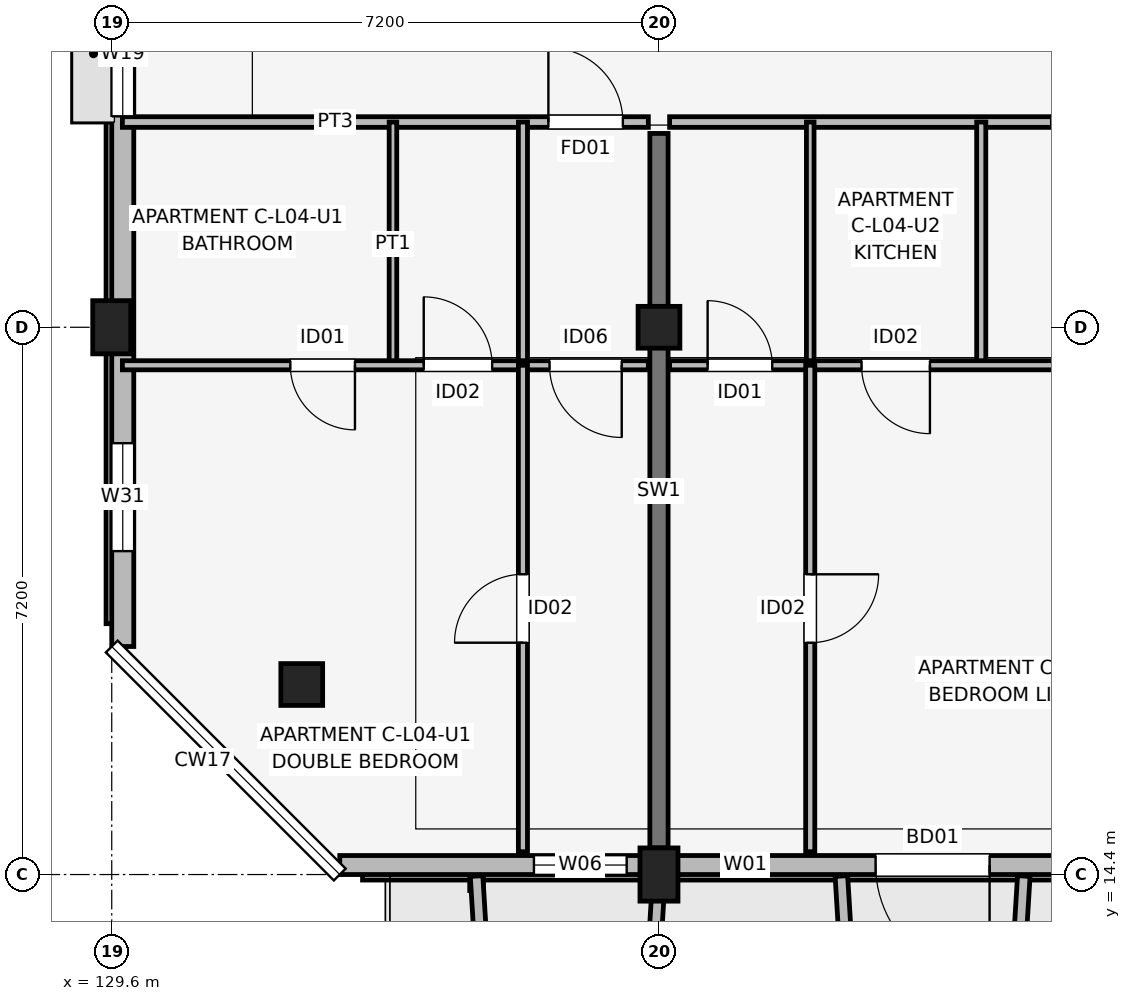
"""IFC4 building model, lengths in metres.
Left out: names, types, materials, properties, quantities, classifications, styles, units other than length and angle.
Written with IfcOpenShell. Run it as: python <this file> out.ifc"""

import sys

from ifc_helpers import new_model, si_unit, direction, frame, frame_2d, origin, origin_2d, place, context, subcontext, project, spatial, rectangle, extrude, element, fill, save


model = new_model("IFC4")
c1 = context("Model", 3, precision=1e-05, world=origin(), true_north=direction((0.0, 1.0)))
c2 = subcontext(c1, "Body", "Model", "MODEL_VIEW")
j1 = project(units=[si_unit("LENGTHUNIT", "METRE"), si_unit("PLANEANGLEUNIT", "RADIAN")], contexts=[c1])
p1 = place(None, origin())
s1 = spatial("IfcSite", under=j1, at=p1, CompositionType="ELEMENT")
p2 = place(p1, origin())
s2 = spatial("IfcBuilding", under=s1, at=p2, CompositionType="ELEMENT")
p3 = place(p2, frame((0.0, 0.0, 15.0)))
s3 = spatial("IfcBuildingStorey", under=s2, at=p3, CompositionType="ELEMENT", Elevation=15.0)
p4 = place(p3, frame((132.1, 16.9, 0.0), z_axis=(0.0, 0.0, 1.0), x_axis=(1.0, 0.0, 0.0)))
e1 = element("IfcColumn", 1, at=p4, inside=s3, PredefinedType="COLUMN", context=c2, shape_type="SweptSolid", body=[
    extrude(rectangle(XDim=0.55, YDim=0.55, at=origin_2d()), origin(), (0.0, 0.0, 1.0), 3.15),
])
for number, where, z_axis, x_axis in (
    (2, (129.6, 21.6, 0.0), (0.0, 0.0, 1.0), (1.0, 0.0, 0.0)),
    (3, (136.8, 14.4, 0.0), (0.0, 0.0, 1.0), (1.0, 0.0, 0.0)),
):
    element("IfcColumn", number, at=place(p3, frame(where, z_axis=z_axis, x_axis=x_axis)), inside=s3, PredefinedType="COLUMN", context=c2, shape_type="SweptSolid", body=[
        extrude(rectangle(XDim=0.5, YDim=0.7, at=origin_2d()), origin(), (0.0, 0.0, 1.0), 3.15),
    ])
p5 = place(p3, frame((136.8, 21.6, 0.0), z_axis=(0.0, 0.0, 1.0), x_axis=(1.0, 0.0, 0.0)))
e4 = element("IfcColumn", 4, at=p5, inside=s3, PredefinedType="COLUMN", context=c2, shape_type="SweptSolid", body=[
    extrude(rectangle(XDim=0.55, YDim=0.55, at=origin_2d()), origin(), (0.0, 0.0, 1.0), 3.15),
])
p6 = place(p3, frame((136.8, 14.75, 0.0), z_axis=(0.0, 0.0, 1.0), x_axis=(0.0, 1.0, 0.0)))
e5 = element("IfcWall", 5, at=p6, inside=s3, PredefinedType="SHEAR", context=c2, shape_type="SweptSolid", body=[
    extrude(rectangle(XDim=9.4, YDim=0.24, at=frame_2d((4.7, 0.0))), origin(), (0.0, 0.0, 1.0), 3.15),
])
p7 = place(p3, frame((132.6, 14.525, 0.0), z_axis=(0.0, 0.0, 1.0), x_axis=(1.0, 0.0, 0.0)))
e6 = element("IfcWall", 6, at=p7, inside=s3, PredefinedType="SOLIDWALL", context=c2, shape_type="SweptSolid", body=[
    extrude(rectangle(XDim=30.0, YDim=0.25, at=frame_2d((15.0, 0.0))), origin(), (0.0, 0.0, 1.0), 2.43),
])
p8 = place(p7, frame((8.55, 0.0, 0.0), z_axis=(0.0, 0.0, 1.0), x_axis=(-1.0, 0.0, 0.0)))
e7 = element("IfcOpeningElement", 7, at=p8, cuts=e6, PredefinedType="OPENING", context=c2, shape_type="SweptSolid", body=[
    extrude(rectangle(XDim=1.5, YDim=2.15, at=frame_2d((0.75, 1.075))), frame((0.0, 0.135, 0.0), z_axis=(0.0, -1.0, 0.0), x_axis=(1.0, 0.0, 0.0)), (0.0, 0.0, 1.0), 0.27),
])
p9 = place(p7, frame((23.1, 0.0, 0.0), z_axis=(0.0, 0.0, 1.0), x_axis=(-1.0, 0.0, 0.0)))
e8 = element("IfcOpeningElement", 8, at=p9, cuts=e6, PredefinedType="OPENING", context=c2, shape_type="SweptSolid", body=[
    extrude(rectangle(XDim=1.8, YDim=2.15, at=frame_2d((0.9, 1.075))), frame((0.0, 0.135, 0.0), z_axis=(0.0, -1.0, 0.0), x_axis=(1.0, 0.0, 0.0)), (0.0, 0.0, 1.0), 0.27),
])
p10 = place(p7, frame((2.555, 0.0, 0.75)))
e9 = element("IfcOpeningElement", 9, at=p10, cuts=e6, PredefinedType="OPENING", context=c2, shape_type="SweptSolid", body=[
    extrude(rectangle(XDim=1.22, YDim=1.5, at=frame_2d((0.61, 0.75))), frame((0.0, 0.135, 0.0), z_axis=(0.0, -1.0, 0.0), x_axis=(1.0, 0.0, 0.0)), (0.0, 0.0, 1.0), 0.27),
])
p11 = place(p7, frame((5.035, 0.0, 0.75)))
e10 = element("IfcOpeningElement", 10, at=p11, cuts=e6, PredefinedType="OPENING", context=c2, shape_type="SweptSolid", body=[
    extrude(rectangle(XDim=0.6, YDim=1.25, at=frame_2d((0.3, 0.625))), frame((0.0, 0.135, 0.0), z_axis=(0.0, -1.0, 0.0), x_axis=(1.0, 0.0, 0.0)), (0.0, 0.0, 1.0), 0.27),
])
p12 = place(p7, frame((12.3, 0.0, 0.75)))
e11 = element("IfcOpeningElement", 11, at=p12, cuts=e6, PredefinedType="OPENING", context=c2, shape_type="SweptSolid", body=[
    extrude(rectangle(XDim=0.72, YDim=1.35, at=frame_2d((0.36, 0.675))), frame((0.0, 0.135, 0.0), z_axis=(0.0, -1.0, 0.0), x_axis=(1.0, 0.0, 0.0)), (0.0, 0.0, 1.0), 0.27),
])
p13 = place(p7, frame((14.0, 0.0, 0.67)))
e12 = element("IfcOpeningElement", 12, at=p13, cuts=e6, PredefinedType="OPENING", context=c2, shape_type="SweptSolid", body=[
    extrude(rectangle(XDim=2.0, YDim=1.65, at=frame_2d((1.0, 0.825))), frame((0.0, 0.135, 0.0), z_axis=(0.0, -1.0, 0.0), x_axis=(1.0, 0.0, 0.0)), (0.0, 0.0, 1.0), 0.27),
])
p14 = place(p7, frame((19.37, 0.0, 0.75)))
e13 = element("IfcOpeningElement", 13, at=p14, cuts=e6, PredefinedType="OPENING", context=c2, shape_type="SweptSolid", body=[
    extrude(rectangle(XDim=0.98, YDim=1.45, at=frame_2d((0.49, 0.725))), frame((0.0, 0.135, 0.0), z_axis=(0.0, -1.0, 0.0), x_axis=(1.0, 0.0, 0.0)), (0.0, 0.0, 1.0), 0.27),
])
p15 = place(p7, frame((26.215, 0.0, 0.7)))
e14 = element("IfcOpeningElement", 14, at=p15, cuts=e6, PredefinedType="OPENING", context=c2, shape_type="SweptSolid", body=[
    extrude(rectangle(XDim=1.86, YDim=1.6, at=frame_2d((0.93, 0.8))), frame((0.0, 0.135, 0.0), z_axis=(0.0, -1.0, 0.0), x_axis=(1.0, 0.0, 0.0)), (0.0, 0.0, 1.0), 0.27),
])
p16 = place(p3, frame((129.745, 33.0, 0.0), z_axis=(0.0, 0.0, 1.0), x_axis=(0.0, -1.0, 0.0)))
e15 = element("IfcWall", 15, at=p16, inside=s3, PredefinedType="SOLIDWALL", context=c2, shape_type="SweptSolid", body=[
    extrude(rectangle(XDim=15.6, YDim=0.29, at=frame_2d((7.8, 0.0))), origin(), (0.0, 0.0, 1.0), 2.38),
])
p17 = place(p16, frame((6.975, 0.0, 1.05)))
e16 = element("IfcOpeningElement", 16, at=p17, cuts=e15, PredefinedType="OPENING", context=c2, shape_type="SweptSolid", body=[
    extrude(rectangle(XDim=1.65, YDim=1.15, at=frame_2d((0.825, 0.575))), frame((0.0, 0.155, 0.0), z_axis=(0.0, -1.0, 0.0), x_axis=(1.0, 0.0, 0.0)), (0.0, 0.0, 1.0), 0.31),
])
p18 = place(p16, frame((12.925, 0.0, 0.67)))
e17 = element("IfcOpeningElement", 17, at=p18, cuts=e15, PredefinedType="OPENING", context=c2, shape_type="SweptSolid", body=[
    extrude(rectangle(XDim=1.42, YDim=1.6, at=frame_2d((0.71, 0.8))), frame((0.0, 0.155, 0.0), z_axis=(0.0, -1.0, 0.0), x_axis=(1.0, 0.0, 0.0)), (0.0, 0.0, 1.0), 0.31),
])
for number, where, z_axis, x_axis in (
    (18, (134.4, 14.38, 0.0), (0.0, 0.0, 1.0), (0.061, -0.998, 0.0)),
    (19, (136.8, 14.38, 0.0), (0.0, 0.0, 1.0), (-0.061, -0.998, 0.0)),
):
    element("IfcWall", number, at=place(p3, frame(where, z_axis=z_axis, x_axis=x_axis)), inside=s3, PredefinedType="ELEMENTEDWALL", context=c2, shape_type="SweptSolid", body=[
        extrude(rectangle(XDim=1.964, YDim=0.165, at=frame_2d((0.982, 0.0))), origin(), (0.0, 0.0, 1.0), 2.95),
    ])
for number, where, z_axis, x_axis in (
    (20, (139.2, 14.38, 0.0), (0.0, 0.0, 1.0), (0.061, -0.998, 0.0)),
    (21, (141.6, 14.38, 0.0), (0.0, 0.0, 1.0), (-0.061, -0.998, 0.0)),
):
    element("IfcWall", number, at=place(p3, frame(where, z_axis=z_axis, x_axis=x_axis)), inside=s3, PredefinedType="ELEMENTEDWALL", context=c2, shape_type="SweptSolid", body=[
        extrude(rectangle(XDim=1.964, YDim=0.165, at=frame_2d((0.982, 0.0))), origin(), (0.0, 0.0, 1.0), 2.53),
    ])
p19 = place(p3, frame((129.74, 24.3, 0.0), z_axis=(0.0, 0.0, 1.0), x_axis=(1.0, 0.0, 0.0)))
e22 = element("IfcWall", 22, at=p19, inside=s3, PredefinedType="PARTITIONING", context=c2, shape_type="SweptSolid", body=[
    extrude(rectangle(XDim=6.92, YDim=0.14, at=frame_2d((3.46, 0.0))), origin(), (0.0, 0.0, 1.0), 2.38),
])
p20 = place(p19, frame((5.605, 0.0, 0.0)))
e23 = element("IfcOpeningElement", 23, at=p20, cuts=e22, PredefinedType="OPENING", context=c2, shape_type="SweptSolid", body=[
    extrude(rectangle(XDim=0.98, YDim=2.1, at=frame_2d((0.49, 1.05))), frame((0.0, 0.08, 0.0), z_axis=(0.0, -1.0, 0.0), x_axis=(1.0, 0.0, 0.0)), (0.0, 0.0, 1.0), 0.16),
])
p21 = place(p3, frame((133.3, 21.1, 0.0), z_axis=(0.0, 0.0, 1.0), x_axis=(0.0, 1.0, 0.0)))
e24 = element("IfcWall", 24, at=p21, inside=s3, PredefinedType="PARTITIONING", context=c2, shape_type="SweptSolid", body=[
    extrude(rectangle(XDim=3.2, YDim=0.1, at=frame_2d((1.6, 0.0))), origin(), (0.0, 0.0, 1.0), 2.375),
])
p22 = place(p3, frame((135.01, 21.1, 0.0), z_axis=(0.0, 0.0, 1.0), x_axis=(0.0, 1.0, 0.0)))
e25 = element("IfcWall", 25, at=p22, inside=s3, PredefinedType="PARTITIONING", context=c2, shape_type="SweptSolid", body=[
    extrude(rectangle(XDim=3.2, YDim=0.12, at=frame_2d((1.6, 0.0))), origin(), (0.0, 0.0, 1.0), 2.375),
])
p23 = place(p3, frame((129.74, 21.1, 0.0), z_axis=(0.0, 0.0, 1.0), x_axis=(1.0, 0.0, 0.0)))
e26 = element("IfcWall", 26, at=p23, inside=s3, PredefinedType="PARTITIONING", context=c2, shape_type="SweptSolid", body=[
    extrude(rectangle(XDim=6.92, YDim=0.12, at=frame_2d((3.46, 0.0))), origin(), (0.0, 0.0, 1.0), 2.38),
])
p24 = place(p23, frame((3.06, 0.0, 0.0), z_axis=(0.0, 0.0, 1.0), x_axis=(-1.0, 0.0, 0.0)))
e27 = element("IfcOpeningElement", 27, at=p24, cuts=e26, PredefinedType="OPENING", context=c2, shape_type="SweptSolid", body=[
    extrude(rectangle(XDim=0.85, YDim=2.08, at=frame_2d((0.425, 1.04))), frame((0.0, 0.07, 0.0), z_axis=(0.0, -1.0, 0.0), x_axis=(1.0, 0.0, 0.0)), (0.0, 0.0, 1.0), 0.14),
])
p25 = place(p23, frame((3.965, 0.0, 0.0)))
e28 = element("IfcOpeningElement", 28, at=p25, cuts=e26, PredefinedType="OPENING", context=c2, shape_type="SweptSolid", body=[
    extrude(rectangle(XDim=0.9, YDim=2.08, at=frame_2d((0.45, 1.04))), frame((0.0, 0.07, 0.0), z_axis=(0.0, -1.0, 0.0), x_axis=(1.0, 0.0, 0.0)), (0.0, 0.0, 1.0), 0.14),
])
p26 = place(p23, frame((6.57, 0.0, 0.0), z_axis=(0.0, 0.0, 1.0), x_axis=(-1.0, 0.0, 0.0)))
e29 = element("IfcOpeningElement", 29, at=p26, cuts=e26, PredefinedType="OPENING", context=c2, shape_type="SweptSolid", body=[
    extrude(rectangle(XDim=0.95, YDim=2.08, at=frame_2d((0.475, 1.04))), frame((0.0, 0.07, 0.0), z_axis=(0.0, -1.0, 0.0), x_axis=(1.0, 0.0, 0.0)), (0.0, 0.0, 1.0), 0.14),
])
p27 = place(p3, frame((135.01, 14.7, 0.0), z_axis=(0.0, 0.0, 1.0), x_axis=(0.0, 1.0, 0.0)))
e30 = element("IfcWall", 30, at=p27, inside=s3, PredefinedType="PARTITIONING", context=c2, shape_type="SweptSolid", body=[
    extrude(rectangle(XDim=6.4, YDim=0.12, at=frame_2d((3.2, 0.0))), origin(), (0.0, 0.0, 1.0), 2.38),
])
p28 = place(p27, frame((2.75, 0.0, 0.0)))
e31 = element("IfcOpeningElement", 31, at=p28, cuts=e30, PredefinedType="OPENING", context=c2, shape_type="SweptSolid", body=[
    extrude(rectangle(XDim=0.9, YDim=2.08, at=frame_2d((0.45, 1.04))), frame((0.0, 0.07, 0.0), z_axis=(0.0, -1.0, 0.0), x_axis=(1.0, 0.0, 0.0)), (0.0, 0.0, 1.0), 0.14),
])
p29 = place(p3, frame((136.94, 24.3, 0.0), z_axis=(0.0, 0.0, 1.0), x_axis=(1.0, 0.0, 0.0)))
e32 = element("IfcWall", 32, at=p29, inside=s3, PredefinedType="PARTITIONING", context=c2, shape_type="SweptSolid", body=[
    extrude(rectangle(XDim=6.92, YDim=0.14, at=frame_2d((3.46, 0.0))), origin(), (0.0, 0.0, 1.0), 2.38),
])
p30 = place(p29, frame((6.0, 0.0, 0.0), z_axis=(0.0, 0.0, 1.0), x_axis=(-1.0, 0.0, 0.0)))
e33 = element("IfcOpeningElement", 33, at=p30, cuts=e32, PredefinedType="OPENING", context=c2, shape_type="SweptSolid", body=[
    extrude(rectangle(XDim=0.98, YDim=2.1, at=frame_2d((0.49, 1.05))), frame((0.0, 0.08, 0.0), z_axis=(0.0, -1.0, 0.0), x_axis=(1.0, 0.0, 0.0)), (0.0, 0.0, 1.0), 0.16),
])
p31 = place(p3, frame((138.79, 21.1, 0.0), z_axis=(0.0, 0.0, 1.0), x_axis=(0.0, 1.0, 0.0)))
e34 = element("IfcWall", 34, at=p31, inside=s3, PredefinedType="PARTITIONING", context=c2, shape_type="SweptSolid", body=[
    extrude(rectangle(XDim=3.2, YDim=0.1, at=frame_2d((1.6, 0.0))), origin(), (0.0, 0.0, 1.0), 2.375),
])
p32 = place(p3, frame((141.04, 21.1, 0.0), z_axis=(0.0, 0.0, 1.0), x_axis=(0.0, 1.0, 0.0)))
e35 = element("IfcWall", 35, at=p32, inside=s3, PredefinedType="PARTITIONING", context=c2, shape_type="SweptSolid", body=[
    extrude(rectangle(XDim=3.2, YDim=0.12, at=frame_2d((1.6, 0.0))), origin(), (0.0, 0.0, 1.0), 2.375),
])
p33 = place(p3, frame((136.94, 21.1, 0.0), z_axis=(0.0, 0.0, 1.0), x_axis=(1.0, 0.0, 0.0)))
e36 = element("IfcWall", 36, at=p33, inside=s3, PredefinedType="PARTITIONING", context=c2, shape_type="SweptSolid", body=[
    extrude(rectangle(XDim=6.92, YDim=0.12, at=frame_2d((3.46, 0.0))), origin(), (0.0, 0.0, 1.0), 2.38),
])
p34 = place(p33, frame((0.5, 0.0, 0.0)))
e37 = element("IfcOpeningElement", 37, at=p34, cuts=e36, PredefinedType="OPENING", context=c2, shape_type="SweptSolid", body=[
    extrude(rectangle(XDim=0.85, YDim=2.08, at=frame_2d((0.425, 1.04))), frame((0.0, 0.07, 0.0), z_axis=(0.0, -1.0, 0.0), x_axis=(1.0, 0.0, 0.0)), (0.0, 0.0, 1.0), 0.14),
])
p35 = place(p33, frame((3.425, 0.0, 0.0), z_axis=(0.0, 0.0, 1.0), x_axis=(-1.0, 0.0, 0.0)))
e38 = element("IfcOpeningElement", 38, at=p35, cuts=e36, PredefinedType="OPENING", context=c2, shape_type="SweptSolid", body=[
    extrude(rectangle(XDim=0.9, YDim=2.08, at=frame_2d((0.45, 1.04))), frame((0.0, 0.07, 0.0), z_axis=(0.0, -1.0, 0.0), x_axis=(1.0, 0.0, 0.0)), (0.0, 0.0, 1.0), 0.14),
])
p36 = place(p33, frame((5.035, 0.0, 0.0)))
e39 = element("IfcOpeningElement", 39, at=p36, cuts=e36, PredefinedType="OPENING", context=c2, shape_type="SweptSolid", body=[
    extrude(rectangle(XDim=0.95, YDim=2.08, at=frame_2d((0.475, 1.04))), frame((0.0, 0.07, 0.0), z_axis=(0.0, -1.0, 0.0), x_axis=(1.0, 0.0, 0.0)), (0.0, 0.0, 1.0), 0.14),
])
p37 = place(p3, frame((138.79, 14.7, 0.0), z_axis=(0.0, 0.0, 1.0), x_axis=(0.0, 1.0, 0.0)))
e40 = element("IfcWall", 40, at=p37, inside=s3, PredefinedType="PARTITIONING", context=c2, shape_type="SweptSolid", body=[
    extrude(rectangle(XDim=6.4, YDim=0.12, at=frame_2d((3.2, 0.0))), origin(), (0.0, 0.0, 1.0), 2.38),
])
p38 = place(p37, frame((3.65, 0.0, 0.0), z_axis=(0.0, 0.0, 1.0), x_axis=(-1.0, 0.0, 0.0)))
e41 = element("IfcOpeningElement", 41, at=p38, cuts=e40, PredefinedType="OPENING", context=c2, shape_type="SweptSolid", body=[
    extrude(rectangle(XDim=0.9, YDim=2.08, at=frame_2d((0.45, 1.04))), frame((0.0, 0.07, 0.0), z_axis=(0.0, -1.0, 0.0), x_axis=(1.0, 0.0, 0.0)), (0.0, 0.0, 1.0), 0.14),
])
p39 = place(p8, origin())
e42 = element("IfcDoor", 42, at=p39, inside=s3, OperationType="SINGLE_SWING_RIGHT", PredefinedType="DOOR", context=c2, shape_type="SweptSolid", body=[
    extrude(rectangle(XDim=1.5, YDim=2.15, at=frame_2d((0.75, 1.075))), frame((0.0, 0.025, 0.0), z_axis=(0.0, -1.0, 0.0), x_axis=(1.0, 0.0, 0.0)), (0.0, 0.0, 1.0), 0.05),
])
fill(e7, e42)
p40 = place(p10, origin())
e43 = element("IfcWindow", 43, at=p40, inside=s3, PartitioningType="SINGLE_PANEL", PredefinedType="WINDOW", context=c2, shape_type="SweptSolid", body=[
    extrude(rectangle(XDim=1.22, YDim=1.5, at=frame_2d((0.61, 0.75))), frame((0.0, 0.03, 0.0), z_axis=(0.0, -1.0, 0.0), x_axis=(1.0, 0.0, 0.0)), (0.0, 0.0, 1.0), 0.06),
])
fill(e9, e43)
p41 = place(p11, origin())
e44 = element("IfcWindow", 44, at=p41, inside=s3, PartitioningType="SINGLE_PANEL", PredefinedType="WINDOW", context=c2, shape_type="SweptSolid", body=[
    extrude(rectangle(XDim=0.6, YDim=1.25, at=frame_2d((0.3, 0.625))), frame((0.0, 0.03, 0.0), z_axis=(0.0, -1.0, 0.0), x_axis=(1.0, 0.0, 0.0)), (0.0, 0.0, 1.0), 0.06),
])
fill(e10, e44)
p42 = place(p17, origin())
e45 = element("IfcWindow", 45, at=p42, inside=s3, PartitioningType="SINGLE_PANEL", PredefinedType="WINDOW", context=c2, shape_type="SweptSolid", body=[
    extrude(rectangle(XDim=1.65, YDim=1.15, at=frame_2d((0.825, 0.575))), frame((0.0, 0.03, 0.0), z_axis=(0.0, -1.0, 0.0), x_axis=(1.0, 0.0, 0.0)), (0.0, 0.0, 1.0), 0.06),
])
fill(e16, e45)
p43 = place(p18, origin())
e46 = element("IfcWindow", 46, at=p43, inside=s3, PartitioningType="SINGLE_PANEL", PredefinedType="WINDOW", context=c2, shape_type="SweptSolid", body=[
    extrude(rectangle(XDim=1.42, YDim=1.6, at=frame_2d((0.71, 0.8))), frame((0.0, 0.03, 0.0), z_axis=(0.0, -1.0, 0.0), x_axis=(1.0, 0.0, 0.0)), (0.0, 0.0, 1.0), 0.06),
])
fill(e17, e46)
p44 = place(p20, origin())
e47 = element("IfcDoor", 47, at=p44, inside=s3, OperationType="SINGLE_SWING_LEFT", PredefinedType="DOOR", context=c2, shape_type="SweptSolid", body=[
    extrude(rectangle(XDim=0.98, YDim=2.1, at=frame_2d((0.49, 1.05))), frame((0.0, 0.025, 0.0), z_axis=(0.0, -1.0, 0.0), x_axis=(1.0, 0.0, 0.0)), (0.0, 0.0, 1.0), 0.05),
])
fill(e23, e47)
p45 = place(p24, origin())
e48 = element("IfcDoor", 48, at=p45, inside=s3, OperationType="SINGLE_SWING_RIGHT", PredefinedType="DOOR", context=c2, shape_type="SweptSolid", body=[
    extrude(rectangle(XDim=0.85, YDim=2.08, at=frame_2d((0.425, 1.04))), frame((0.0, 0.025, 0.0), z_axis=(0.0, -1.0, 0.0), x_axis=(1.0, 0.0, 0.0)), (0.0, 0.0, 1.0), 0.05),
])
fill(e27, e48)
p46 = place(p25, origin())
e49 = element("IfcDoor", 49, at=p46, inside=s3, OperationType="SINGLE_SWING_LEFT", PredefinedType="DOOR", context=c2, shape_type="SweptSolid", body=[
    extrude(rectangle(XDim=0.9, YDim=2.08, at=frame_2d((0.45, 1.04))), frame((0.0, 0.025, 0.0), z_axis=(0.0, -1.0, 0.0), x_axis=(1.0, 0.0, 0.0)), (0.0, 0.0, 1.0), 0.05),
])
fill(e28, e49)
p47 = place(p26, origin())
e50 = element("IfcDoor", 50, at=p47, inside=s3, OperationType="SINGLE_SWING_RIGHT", PredefinedType="DOOR", context=c2, shape_type="SweptSolid", body=[
    extrude(rectangle(XDim=0.95, YDim=2.08, at=frame_2d((0.475, 1.04))), frame((0.0, 0.025, 0.0), z_axis=(0.0, -1.0, 0.0), x_axis=(1.0, 0.0, 0.0)), (0.0, 0.0, 1.0), 0.05),
])
fill(e29, e50)
p48 = place(p28, origin())
e51 = element("IfcDoor", 51, at=p48, inside=s3, OperationType="SINGLE_SWING_LEFT", PredefinedType="DOOR", context=c2, shape_type="SweptSolid", body=[
    extrude(rectangle(XDim=0.9, YDim=2.08, at=frame_2d((0.45, 1.04))), frame((0.0, 0.025, 0.0), z_axis=(0.0, -1.0, 0.0), x_axis=(1.0, 0.0, 0.0)), (0.0, 0.0, 1.0), 0.05),
])
fill(e31, e51)
p49 = place(p34, origin())
e52 = element("IfcDoor", 52, at=p49, inside=s3, OperationType="SINGLE_SWING_LEFT", PredefinedType="DOOR", context=c2, shape_type="SweptSolid", body=[
    extrude(rectangle(XDim=0.85, YDim=2.08, at=frame_2d((0.425, 1.04))), frame((0.0, 0.025, 0.0), z_axis=(0.0, -1.0, 0.0), x_axis=(1.0, 0.0, 0.0)), (0.0, 0.0, 1.0), 0.05),
])
fill(e37, e52)
p50 = place(p35, origin())
e53 = element("IfcDoor", 53, at=p50, inside=s3, OperationType="SINGLE_SWING_RIGHT", PredefinedType="DOOR", context=c2, shape_type="SweptSolid", body=[
    extrude(rectangle(XDim=0.9, YDim=2.08, at=frame_2d((0.45, 1.04))), frame((0.0, 0.025, 0.0), z_axis=(0.0, -1.0, 0.0), x_axis=(1.0, 0.0, 0.0)), (0.0, 0.0, 1.0), 0.05),
])
fill(e38, e53)
p51 = place(p38, origin())
e54 = element("IfcDoor", 54, at=p51, inside=s3, OperationType="SINGLE_SWING_RIGHT", PredefinedType="DOOR", context=c2, shape_type="SweptSolid", body=[
    extrude(rectangle(XDim=0.9, YDim=2.08, at=frame_2d((0.45, 1.04))), frame((0.0, 0.025, 0.0), z_axis=(0.0, -1.0, 0.0), x_axis=(1.0, 0.0, 0.0)), (0.0, 0.0, 1.0), 0.05),
])
fill(e41, e54)
save(model, sys.argv[1])
